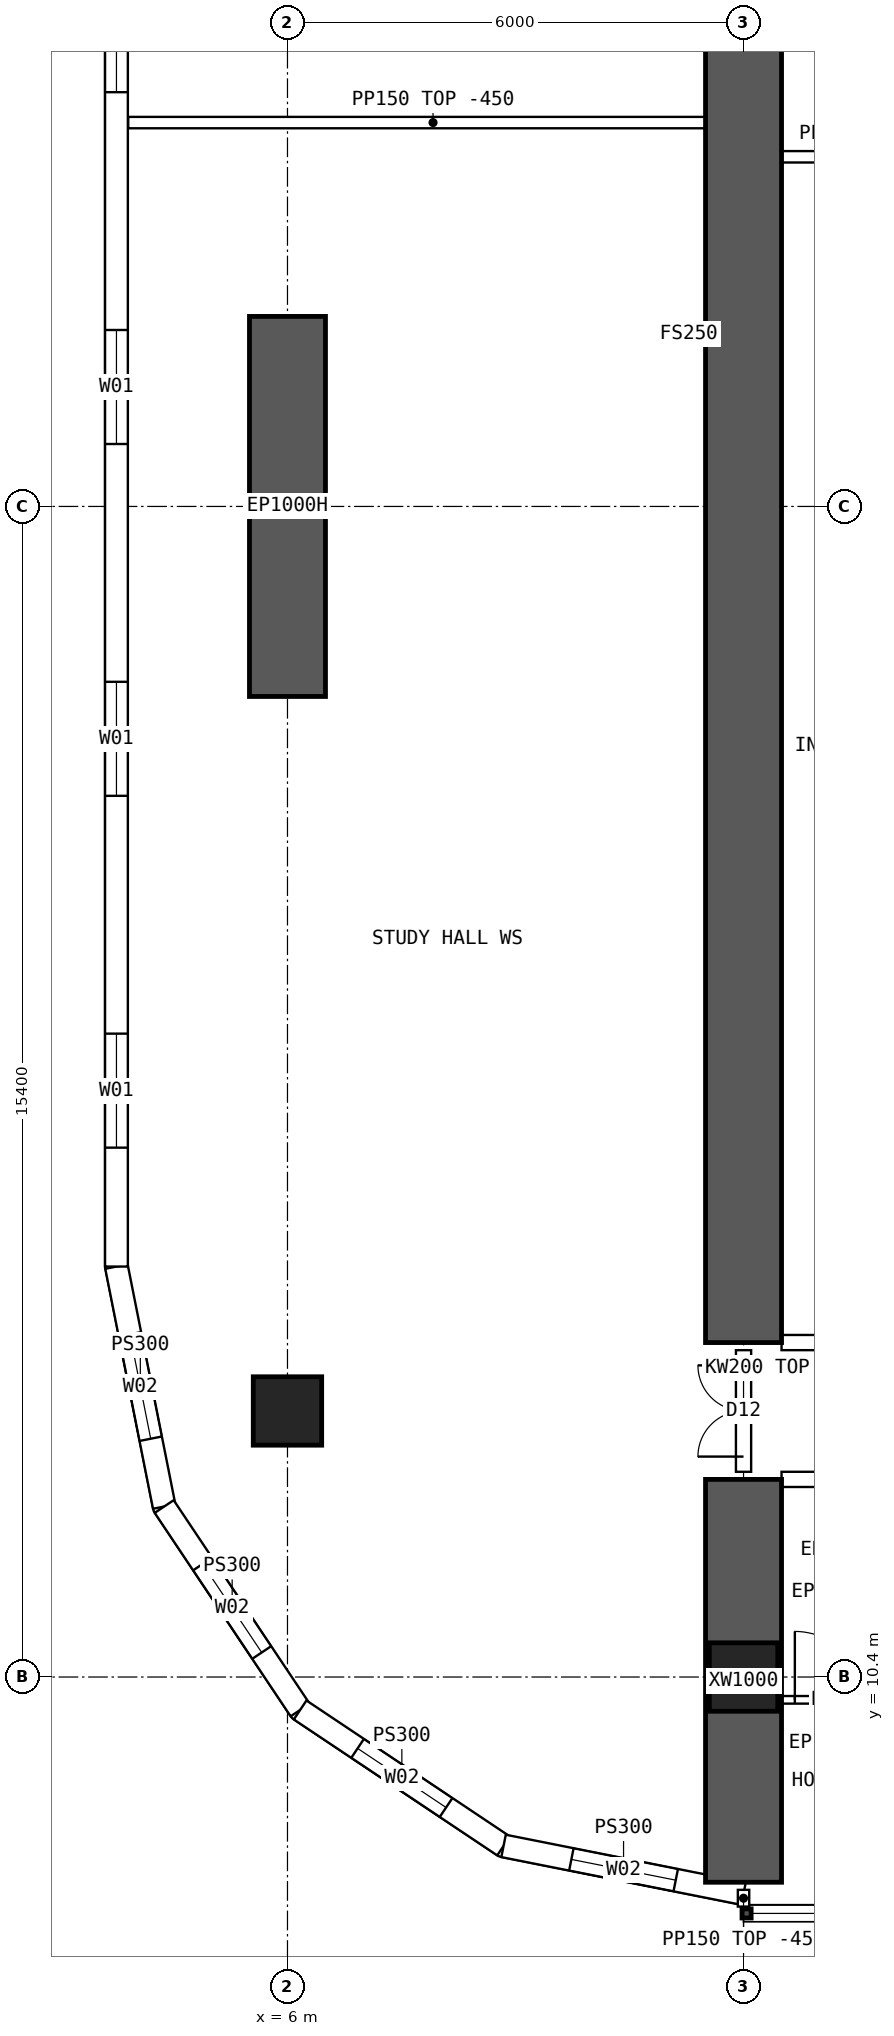
"""IFC4 building model, lengths in metres.
Left out: names, types, materials, properties, quantities, classifications, styles, units other than length and angle.
Written with IfcOpenShell. Run it as: python <this file> out.ifc"""

import sys

from ifc_helpers import new_model, si_unit, direction, frame, frame_2d, origin, origin_2d, place, context, subcontext, project, spatial, polyline, rectangle, hollow_rectangle, outline, extrude, element, fill, save


model = new_model("IFC4")
c1 = context("Model", 3, precision=1e-05, world=origin(), true_north=direction((0.0, 1.0)))
c2 = subcontext(c1, "Body", "Model", "MODEL_VIEW")
j1 = project(units=[si_unit("LENGTHUNIT", "METRE"), si_unit("PLANEANGLEUNIT", "RADIAN")], contexts=[c1])
p1 = place(None, origin())
s1 = spatial("IfcSite", under=j1, at=p1, CompositionType="ELEMENT")
p2 = place(p1, origin())
s2 = spatial("IfcBuilding", under=s1, at=p2, CompositionType="ELEMENT")
p3 = place(p2, frame((0.0, 0.0, 50.2)))
s3 = spatial("IfcBuildingStorey", under=s2, at=p3, CompositionType="ELEMENT", Elevation=50.2)
for number, where, z_axis, x_axis in (
    (1, (12.0, 10.4, 0.0), (0.0, 0.0, 1.0), (1.0, 0.0, 0.0)),
    (2, (6.0, 13.9, 0.0), (0.0, 0.0, 1.0), (1.0, 0.0, 0.0)),
):
    element("IfcColumn", number, at=place(p3, frame(where, z_axis=z_axis, x_axis=x_axis)), inside=s3, PredefinedType="COLUMN", context=c2, shape_type="SweptSolid", body=[
        extrude(hollow_rectangle(XDim=0.9, YDim=0.9, WallThickness=0.09, at=origin_2d()), origin(), (0.0, 0.0, 1.0), 3.75),
    ])
p4 = place(p3, frame((6.0, 23.3, 0.0), z_axis=(0.0, 0.0, 1.0), x_axis=(0.0, 1.0, 0.0)))
e3 = element("IfcWall", 3, at=p4, inside=s3, PredefinedType="SHEAR", context=c2, shape_type="SweptSolid", body=[
    extrude(rectangle(XDim=5.0, YDim=1.0, at=frame_2d((2.5, 0.0))), origin(), (0.0, 0.0, 1.0), 3.75),
])
p5 = place(p3, frame((12.0, 7.7, 0.0), z_axis=(0.0, 0.0, 1.0), x_axis=(0.0, 1.0, 0.0)))
e4 = element("IfcWall", 4, at=p5, inside=s3, PredefinedType="SHEAR", context=c2, shape_type="SweptSolid", body=[
    extrude(rectangle(XDim=5.3, YDim=1.0, at=frame_2d((2.65, 0.0))), origin(), (0.0, 0.0, 1.0), 3.75),
])
p6 = place(p3, frame((12.0, 14.8, 0.0), z_axis=(0.0, 0.0, 1.0), x_axis=(0.0, 1.0, 0.0)))
e5 = element("IfcWall", 5, at=p6, inside=s3, PredefinedType="SHEAR", context=c2, shape_type="SweptSolid", body=[
    extrude(rectangle(XDim=34.4, YDim=1.0, at=frame_2d((17.2, 0.0))), origin(), (0.0, 0.0, 1.0), 3.75),
])
p7 = place(p3, frame((3.75, 48.2, 0.0), z_axis=(0.0, 0.0, 1.0), x_axis=(0.0, -1.0, 0.0)))
e6 = element("IfcWall", 6, at=p7, inside=s3, PredefinedType="SOLIDWALL", context=c2, shape_type="SweptSolid", body=[
    extrude(outline(polyline([(-0.015, -0.15), (32.415, -0.15), (32.385, 0.15), (0.015, 0.15), (-0.015, -0.15)])), origin(), (0.0, 0.0, 1.0), 3.3),
])
p8 = place(p7, frame((1.564, 0.0, 0.9)))
e7 = element("IfcOpeningElement", 7, at=p8, cuts=e6, PredefinedType="OPENING", context=c2, shape_type="SweptSolid", body=[
    extrude(rectangle(XDim=1.5, YDim=2.0, at=frame_2d((0.75, 1.0))), frame((0.0, 0.16, 0.0), z_axis=(0.0, -1.0, 0.0), x_axis=(1.0, 0.0, 0.0)), (0.0, 0.0, 1.0), 0.32),
])
p9 = place(p7, frame((6.193, 0.0, 0.9)))
e8 = element("IfcOpeningElement", 8, at=p9, cuts=e6, PredefinedType="OPENING", context=c2, shape_type="SweptSolid", body=[
    extrude(rectangle(XDim=1.5, YDim=2.0, at=frame_2d((0.75, 1.0))), frame((0.0, 0.16, 0.0), z_axis=(0.0, -1.0, 0.0), x_axis=(1.0, 0.0, 0.0)), (0.0, 0.0, 1.0), 0.32),
])
p10 = place(p7, frame((10.822, 0.0, 0.9)))
e9 = element("IfcOpeningElement", 9, at=p10, cuts=e6, PredefinedType="OPENING", context=c2, shape_type="SweptSolid", body=[
    extrude(rectangle(XDim=1.5, YDim=2.0, at=frame_2d((0.75, 1.0))), frame((0.0, 0.16, 0.0), z_axis=(0.0, -1.0, 0.0), x_axis=(1.0, 0.0, 0.0)), (0.0, 0.0, 1.0), 0.32),
])
p11 = place(p7, frame((15.45, 0.0, 0.9)))
e10 = element("IfcOpeningElement", 10, at=p11, cuts=e6, PredefinedType="OPENING", context=c2, shape_type="SweptSolid", body=[
    extrude(rectangle(XDim=1.5, YDim=2.0, at=frame_2d((0.75, 1.0))), frame((0.0, 0.16, 0.0), z_axis=(0.0, -1.0, 0.0), x_axis=(1.0, 0.0, 0.0)), (0.0, 0.0, 1.0), 0.32),
])
p12 = place(p7, frame((20.079, 0.0, 0.9)))
e11 = element("IfcOpeningElement", 11, at=p12, cuts=e6, PredefinedType="OPENING", context=c2, shape_type="SweptSolid", body=[
    extrude(rectangle(XDim=1.5, YDim=2.0, at=frame_2d((0.75, 1.0))), frame((0.0, 0.16, 0.0), z_axis=(0.0, -1.0, 0.0), x_axis=(1.0, 0.0, 0.0)), (0.0, 0.0, 1.0), 0.32),
])
p13 = place(p7, frame((24.707, 0.0, 0.9)))
e12 = element("IfcOpeningElement", 12, at=p13, cuts=e6, PredefinedType="OPENING", context=c2, shape_type="SweptSolid", body=[
    extrude(rectangle(XDim=1.5, YDim=2.0, at=frame_2d((0.75, 1.0))), frame((0.0, 0.16, 0.0), z_axis=(0.0, -1.0, 0.0), x_axis=(1.0, 0.0, 0.0)), (0.0, 0.0, 1.0), 0.32),
])
p14 = place(p7, frame((29.336, 0.0, 0.9)))
e13 = element("IfcOpeningElement", 13, at=p14, cuts=e6, PredefinedType="OPENING", context=c2, shape_type="SweptSolid", body=[
    extrude(rectangle(XDim=1.5, YDim=2.0, at=frame_2d((0.75, 1.0))), frame((0.0, 0.16, 0.0), z_axis=(0.0, -1.0, 0.0), x_axis=(1.0, 0.0, 0.0)), (0.0, 0.0, 1.0), 0.32),
])
p15 = place(p3, frame((3.75, 15.8, 0.0), z_axis=(0.0, 0.0, 1.0), x_axis=(0.195065901187, -0.980790137692, 0.0)))
e14 = element("IfcWall", 14, at=p15, inside=s3, PredefinedType="SOLIDWALL", context=c2, shape_type="SweptSolid", body=[
    extrude(outline(polyline([(-0.015, -0.15), (3.249, -0.15), (3.189, 0.15), (0.015, 0.15), (-0.015, -0.15)])), origin(), (0.0, 0.0, 1.0), 3.3),
])
p16 = place(p15, frame((0.909, 0.0, 0.9)))
e15 = element("IfcOpeningElement", 15, at=p16, cuts=e14, PredefinedType="OPENING", context=c2, shape_type="SweptSolid", body=[
    extrude(rectangle(XDim=1.4, YDim=1.8, at=frame_2d((0.7, 0.9))), frame((0.0, 0.16, 0.0), z_axis=(0.0, -1.0, 0.0), x_axis=(1.0, 0.0, 0.0)), (0.0, 0.0, 1.0), 0.32),
])
p17 = place(p3, frame((4.378, 12.643, 0.0), z_axis=(0.0, 0.0, 1.0), x_axis=(0.555609954424, -0.831443069936, 0.0)))
e16 = element("IfcWall", 16, at=p17, inside=s3, PredefinedType="SOLIDWALL", context=c2, shape_type="SweptSolid", body=[
    extrude(outline(polyline([(-0.03, -0.15), (3.249, -0.15), (3.189, 0.15), (0.03, 0.15), (-0.03, -0.15)])), origin(), (0.0, 0.0, 1.0), 3.3),
])
p18 = place(p17, frame((0.909, 0.0, 0.9)))
e17 = element("IfcOpeningElement", 17, at=p18, cuts=e16, PredefinedType="OPENING", context=c2, shape_type="SweptSolid", body=[
    extrude(rectangle(XDim=1.4, YDim=1.8, at=frame_2d((0.7, 0.9))), frame((0.0, 0.16, 0.0), z_axis=(0.0, -1.0, 0.0), x_axis=(1.0, 0.0, 0.0)), (0.0, 0.0, 1.0), 0.32),
])
p19 = place(p3, frame((6.167, 9.966, 0.0), z_axis=(0.0, 0.0, 1.0), x_axis=(0.831478105043, -0.555557522525, 0.0)))
e18 = element("IfcWall", 18, at=p19, inside=s3, PredefinedType="SOLIDWALL", context=c2, shape_type="SweptSolid", body=[
    extrude(outline(polyline([(-0.03, -0.15), (3.249, -0.15), (3.189, 0.15), (0.03, 0.15), (-0.03, -0.15)])), origin(), (0.0, 0.0, 1.0), 3.3),
])
p20 = place(p19, frame((0.909, 0.0, 0.9)))
e19 = element("IfcOpeningElement", 19, at=p20, cuts=e18, PredefinedType="OPENING", context=c2, shape_type="SweptSolid", body=[
    extrude(rectangle(XDim=1.4, YDim=1.8, at=frame_2d((0.7, 0.9))), frame((0.0, 0.16, 0.0), z_axis=(0.0, -1.0, 0.0), x_axis=(1.0, 0.0, 0.0)), (0.0, 0.0, 1.0), 0.32),
])
p21 = place(p3, frame((8.843, 8.178, 0.0), z_axis=(0.0, 0.0, 1.0), x_axis=(0.980787251524, -0.195080412259, 0.0)))
e20 = element("IfcWall", 20, at=p21, inside=s3, PredefinedType="SOLIDWALL", context=c2, shape_type="SweptSolid", body=[
    extrude(outline(polyline([(-0.03, -0.15), (3.249, -0.15), (3.189, 0.15), (0.03, 0.15), (-0.03, -0.15)])), origin(), (0.0, 0.0, 1.0), 3.3),
])
p22 = place(p21, frame((0.909, 0.0, 0.9)))
e21 = element("IfcOpeningElement", 21, at=p22, cuts=e20, PredefinedType="OPENING", context=c2, shape_type="SweptSolid", body=[
    extrude(rectangle(XDim=1.4, YDim=1.8, at=frame_2d((0.7, 0.9))), frame((0.0, 0.16, 0.0), z_axis=(0.0, -1.0, 0.0), x_axis=(1.0, 0.0, 0.0)), (0.0, 0.0, 1.0), 0.32),
])
p23 = place(p3, frame((12.5, 13.0, 0.0), z_axis=(0.0, 0.0, 1.0), x_axis=(1.0, 0.0, 0.0)))
e22 = element("IfcWall", 22, at=p23, inside=s3, PredefinedType="SOLIDWALL", context=c2, shape_type="SweptSolid", body=[
    extrude(outline(polyline([(0.0, 0.0), (5.0, 0.0), (5.0, 2.9), (0.0, 2.9), (0.0, 0.0)])), frame((0.0, 0.1, 0.0), z_axis=(0.0, -1.0, 0.0), x_axis=(1.0, 0.0, 0.0)), (0.0, 0.0, 1.0), 0.2),
])
p24 = place(p23, frame((1.3, 0.0, 0.0)))
e23 = element("IfcOpeningElement", 23, at=p24, cuts=e22, PredefinedType="OPENING", context=c2, shape_type="SweptSolid", body=[
    extrude(rectangle(XDim=0.9, YDim=2.1, at=frame_2d((0.45, 1.05))), frame((0.0, 0.11, 0.0), z_axis=(0.0, -1.0, 0.0), x_axis=(1.0, 0.0, 0.0)), (0.0, 0.0, 1.0), 0.22),
])
p25 = place(p23, frame((2.675, 0.0, 0.0)))
e24 = element("IfcOpeningElement", 24, at=p25, cuts=e22, PredefinedType="OPENING", context=c2, shape_type="SweptSolid", body=[
    extrude(rectangle(XDim=0.9, YDim=2.1, at=frame_2d((0.45, 1.05))), frame((0.0, 0.11, 0.0), z_axis=(0.0, -1.0, 0.0), x_axis=(1.0, 0.0, 0.0)), (0.0, 0.0, 1.0), 0.22),
])
p26 = place(p3, frame((12.5, 14.8, 0.0), z_axis=(0.0, 0.0, 1.0), x_axis=(1.0, 0.0, 0.0)))
e25 = element("IfcWall", 25, at=p26, inside=s3, PredefinedType="SOLIDWALL", context=c2, shape_type="SweptSolid", body=[
    extrude(rectangle(XDim=5.0, YDim=0.2, at=frame_2d((2.5, 0.0))), origin(), (0.0, 0.0, 1.0), 3.3),
])
p27 = place(p26, frame((3.3, 0.0, 0.0)))
e26 = element("IfcOpeningElement", 26, at=p27, cuts=e25, PredefinedType="OPENING", context=c2, shape_type="SweptSolid", body=[
    extrude(rectangle(XDim=1.6, YDim=2.1, at=frame_2d((0.8, 1.05))), frame((0.0, 0.11, 0.0), z_axis=(0.0, -1.0, 0.0), x_axis=(1.0, 0.0, 0.0)), (0.0, 0.0, 1.0), 0.22),
])
p28 = place(p3, frame((13.75, 10.1, 0.0), z_axis=(0.0, 0.0, 1.0), x_axis=(-1.0, 0.0, 0.0)))
e27 = element("IfcWall", 27, at=p28, inside=s3, PredefinedType="PARTITIONING", context=c2, shape_type="SweptSolid", body=[
    extrude(rectangle(XDim=1.3, YDim=0.1, at=frame_2d((0.65, 0.0))), origin(), (0.0, 0.0, 1.0), 3.3),
])
p29 = place(p28, frame((0.175, 0.0, 0.0)))
e28 = element("IfcOpeningElement", 28, at=p29, cuts=e27, PredefinedType="OPENING", context=c2, shape_type="SweptSolid", body=[
    extrude(rectangle(XDim=0.9, YDim=2.1, at=frame_2d((0.45, 1.05))), frame((0.0, 0.06, 0.0), z_axis=(0.0, -1.0, 0.0), x_axis=(1.0, 0.0, 0.0)), (0.0, 0.0, 1.0), 0.12),
])
p30 = place(p3, frame((12.0, 30.4, 0.0), z_axis=(0.0, 0.0, 1.0), x_axis=(1.0, 0.0, 0.0)))
e29 = element("IfcWall", 29, at=p30, inside=s3, PredefinedType="PARTITIONING", context=c2, shape_type="SweptSolid", body=[
    extrude(rectangle(XDim=3.6, YDim=0.15, at=frame_2d((1.8, 0.0))), origin(), (0.0, 0.0, 1.0), 3.3),
])
p31 = place(p3, frame((3.905, 30.85, 0.0), z_axis=(0.0, 0.0, 1.0), x_axis=(1.0, 0.0, 0.0)))
e30 = element("IfcWall", 30, at=p31, inside=s3, PredefinedType="PARTITIONING", context=c2, shape_type="SweptSolid", body=[
    extrude(outline(polyline([(0.0, 0.0), (8.02, 0.0), (8.02, 3.3), (2.397, 3.3), (2.395, 2.85), (1.797, 2.85), (1.795, 3.3), (0.0, 3.3), (0.0, 0.0)])), frame((0.0, 0.075, 0.0), z_axis=(0.0, -1.0, 0.0), x_axis=(1.0, 0.0, 0.0)), (0.0, 0.0, 1.0), 0.15),
])
p32 = place(p3, frame((12.0, 13.1, 0.0), z_axis=(0.0, 0.0, 1.0), x_axis=(0.0, 1.0, 0.0)))
e31 = element("IfcWall", 31, at=p32, inside=s3, PredefinedType="SOLIDWALL", context=c2, shape_type="SweptSolid", body=[
    extrude(outline(polyline([(0.0, 0.0), (1.6, 0.0), (1.6, 2.85), (0.0, 2.85), (0.0, 0.0)])), frame((0.0, 0.1, 0.0), z_axis=(0.0, -1.0, 0.0), x_axis=(1.0, 0.0, 0.0)), (0.0, 0.0, 1.0), 0.2),
])
p33 = place(p32, frame((0.2, 0.0, 0.0)))
e32 = element("IfcOpeningElement", 32, at=p33, cuts=e31, PredefinedType="OPENING", context=c2, shape_type="SweptSolid", body=[
    extrude(rectangle(XDim=1.2, YDim=2.1, at=frame_2d((0.6, 1.05))), frame((0.0, 0.11, 0.0), z_axis=(0.0, -1.0, 0.0), x_axis=(1.0, 0.0, 0.0)), (0.0, 0.0, 1.0), 0.22),
])
p34 = place(p3, frame((12.0, 7.6, 0.0), z_axis=(0.0, 0.0, 1.0), x_axis=(0.0, -1.0, 0.0)))
e33 = element("IfcWall", 33, at=p34, inside=s3, PredefinedType="PARTITIONING", context=c2, shape_type="SweptSolid", body=[
    extrude(rectangle(XDim=0.22, YDim=0.15, at=frame_2d((0.11, 0.0))), origin(), (0.0, 0.0, 1.0), 3.3),
])
p35 = place(p11, origin())
e34 = element("IfcWindow", 34, at=p35, inside=s3, PartitioningType="SINGLE_PANEL", PredefinedType="WINDOW", context=c2, shape_type="SweptSolid", body=[
    extrude(rectangle(XDim=1.5, YDim=2.0, at=frame_2d((0.75, 1.0))), frame((0.0, 0.03, 0.0), z_axis=(0.0, -1.0, 0.0), x_axis=(1.0, 0.0, 0.0)), (0.0, 0.0, 1.0), 0.06),
])
fill(e10, e34)
p36 = place(p12, origin())
e35 = element("IfcWindow", 35, at=p36, inside=s3, PartitioningType="SINGLE_PANEL", PredefinedType="WINDOW", context=c2, shape_type="SweptSolid", body=[
    extrude(rectangle(XDim=1.5, YDim=2.0, at=frame_2d((0.75, 1.0))), frame((0.0, 0.03, 0.0), z_axis=(0.0, -1.0, 0.0), x_axis=(1.0, 0.0, 0.0)), (0.0, 0.0, 1.0), 0.06),
])
fill(e11, e35)
p37 = place(p13, origin())
e36 = element("IfcWindow", 36, at=p37, inside=s3, PartitioningType="SINGLE_PANEL", PredefinedType="WINDOW", context=c2, shape_type="SweptSolid", body=[
    extrude(rectangle(XDim=1.5, YDim=2.0, at=frame_2d((0.75, 1.0))), frame((0.0, 0.03, 0.0), z_axis=(0.0, -1.0, 0.0), x_axis=(1.0, 0.0, 0.0)), (0.0, 0.0, 1.0), 0.06),
])
fill(e12, e36)
p38 = place(p14, origin())
e37 = element("IfcWindow", 37, at=p38, inside=s3, PartitioningType="SINGLE_PANEL", PredefinedType="WINDOW", context=c2, shape_type="SweptSolid", body=[
    extrude(rectangle(XDim=1.5, YDim=2.0, at=frame_2d((0.75, 1.0))), frame((0.0, 0.03, 0.0), z_axis=(0.0, -1.0, 0.0), x_axis=(1.0, 0.0, 0.0)), (0.0, 0.0, 1.0), 0.06),
])
fill(e13, e37)
p39 = place(p16, origin())
e38 = element("IfcWindow", 38, at=p39, inside=s3, PartitioningType="SINGLE_PANEL", PredefinedType="WINDOW", context=c2, shape_type="SweptSolid", body=[
    extrude(rectangle(XDim=1.4, YDim=1.8, at=frame_2d((0.7, 0.9))), frame((0.0, 0.03, 0.0), z_axis=(0.0, -1.0, 0.0), x_axis=(1.0, 0.0, 0.0)), (0.0, 0.0, 1.0), 0.06),
])
fill(e15, e38)
p40 = place(p18, origin())
e39 = element("IfcWindow", 39, at=p40, inside=s3, PartitioningType="SINGLE_PANEL", PredefinedType="WINDOW", context=c2, shape_type="SweptSolid", body=[
    extrude(rectangle(XDim=1.4, YDim=1.8, at=frame_2d((0.7, 0.9))), frame((0.0, 0.03, 0.0), z_axis=(0.0, -1.0, 0.0), x_axis=(1.0, 0.0, 0.0)), (0.0, 0.0, 1.0), 0.06),
])
fill(e17, e39)
p41 = place(p20, origin())
e40 = element("IfcWindow", 40, at=p41, inside=s3, PartitioningType="SINGLE_PANEL", PredefinedType="WINDOW", context=c2, shape_type="SweptSolid", body=[
    extrude(rectangle(XDim=1.4, YDim=1.8, at=frame_2d((0.7, 0.9))), frame((0.0, 0.03, 0.0), z_axis=(0.0, -1.0, 0.0), x_axis=(1.0, 0.0, 0.0)), (0.0, 0.0, 1.0), 0.06),
])
fill(e19, e40)
p42 = place(p22, origin())
e41 = element("IfcWindow", 41, at=p42, inside=s3, PartitioningType="SINGLE_PANEL", PredefinedType="WINDOW", context=c2, shape_type="SweptSolid", body=[
    extrude(rectangle(XDim=1.4, YDim=1.8, at=frame_2d((0.7, 0.9))), frame((0.0, 0.03, 0.0), z_axis=(0.0, -1.0, 0.0), x_axis=(1.0, 0.0, 0.0)), (0.0, 0.0, 1.0), 0.06),
])
fill(e21, e41)
p43 = place(p29, origin())
e42 = element("IfcDoor", 42, at=p43, inside=s3, OperationType="SINGLE_SWING_RIGHT", PredefinedType="DOOR", context=c2, shape_type="SweptSolid", body=[
    extrude(rectangle(XDim=0.9, YDim=2.1, at=frame_2d((0.45, 1.05))), frame((0.0, 0.025, 0.0), z_axis=(0.0, -1.0, 0.0), x_axis=(1.0, 0.0, 0.0)), (0.0, 0.0, 1.0), 0.05),
])
fill(e28, e42)
p44 = place(p33, origin())
e43 = element("IfcDoor", 43, at=p44, inside=s3, OperationType="DOUBLE_DOOR_SINGLE_SWING", PredefinedType="DOOR", context=c2, shape_type="SweptSolid", body=[
    extrude(rectangle(XDim=1.2, YDim=2.1, at=frame_2d((0.6, 1.05))), frame((0.0, 0.025, 0.0), z_axis=(0.0, -1.0, 0.0), x_axis=(1.0, 0.0, 0.0)), (0.0, 0.0, 1.0), 0.05),
])
fill(e32, e43)
save(model, sys.argv[1])
